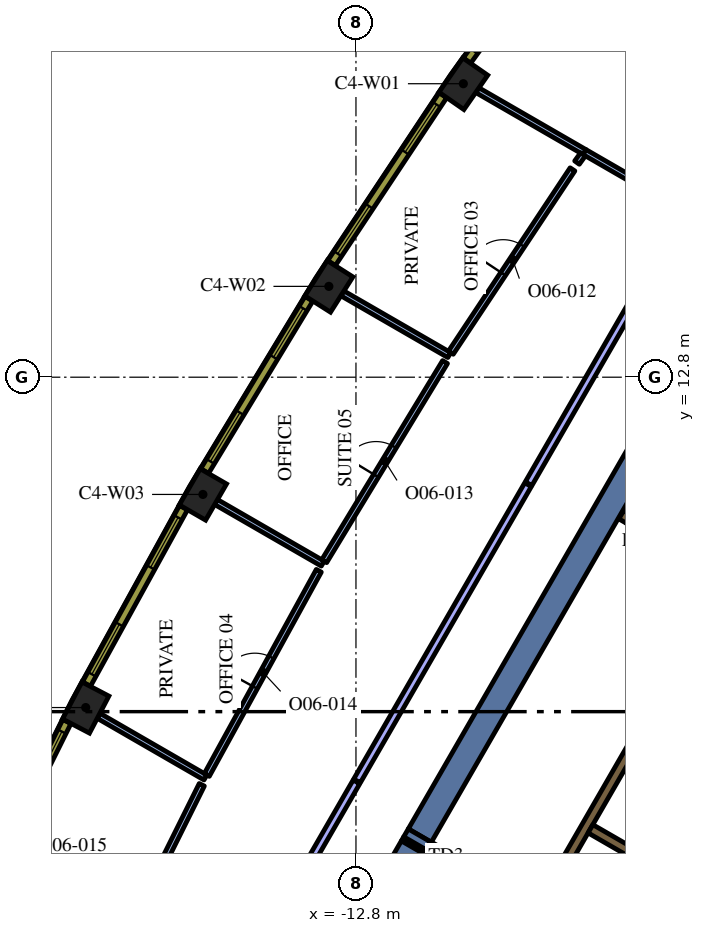
"""IFC4 building model, lengths in metres.
Left out: names, types, materials, properties, quantities, classifications, styles, units other than length and angle.
Written with IfcOpenShell. Run it as: python <this file> out.ifc"""

import sys

from ifc_helpers import new_model, si_unit, direction, frame, frame_2d, origin, origin_2d, place, context, subcontext, project, spatial, polyline, rectangle, outline, extrude, element, fill, save


model = new_model("IFC4")
c1 = context("Model", 3, precision=1e-05, world=origin(), true_north=direction((0.0, 1.0)))
c2 = subcontext(c1, "Body", "Model", "MODEL_VIEW")
j1 = project(units=[si_unit("LENGTHUNIT", "METRE"), si_unit("PLANEANGLEUNIT", "RADIAN")], contexts=[c1])
p1 = place(None, origin())
s1 = spatial("IfcSite", under=j1, at=p1, CompositionType="ELEMENT")
p2 = place(p1, origin())
s2 = spatial("IfcBuilding", under=s1, at=p2, CompositionType="ELEMENT")
p3 = place(p2, frame((0.0, 0.0, 205.8)))
s3 = spatial("IfcBuildingStorey", under=s2, at=p3, CompositionType="ELEMENT", Elevation=205.8)
for number, where, z_axis, x_axis in (
    (1, (-9.975, 20.522, 0.0), (0.0, 0.0, 1.0), (-0.57, -0.822, 0.0)),
    (2, (-13.513, 15.19, 0.0), (0.0, 0.0, 1.0), (-0.536, -0.845, 0.0)),
    (3, (-16.827, 9.715, 0.0), (0.0, 0.0, 1.0), (-0.5, -0.866, 0.0)),
    (4, (-19.912, 4.108, 0.0), (0.0, 0.0, 1.0), (-0.464, -0.886, 0.0)),
):
    element("IfcColumn", number, at=place(p3, frame(where, z_axis=z_axis, x_axis=x_axis)), inside=s3, PredefinedType="COLUMN", context=c2, shape_type="SweptSolid", body=[
        extrude(rectangle(XDim=1.1, YDim=0.8, at=origin_2d()), origin(), (0.0, 0.0, 1.0), 4.2),
    ])
p4 = place(p3, frame((-11.301, 0.426, 0.0), z_axis=(0.0, 0.0, 1.0), x_axis=(0.50111559984, 0.865380353138, 0.0)))
e5 = element("IfcWall", 5, at=p4, inside=s3, PredefinedType="SOLIDWALL", context=c2, shape_type="SweptSolid", body=[
    extrude(rectangle(XDim=0.121, YDim=0.7, at=frame_2d((0.061, 0.0))), origin(), (0.0, 0.0, 1.0), 4.2),
])
p5 = place(p3, frame((-15.321, -6.537, 0.0), z_axis=(0.0, 0.0, 1.0), x_axis=(0.500000268222, 0.866025248926, 0.0)))
e6 = element("IfcWall", 6, at=p5, inside=s3, PredefinedType="SOLIDWALL", context=c2, shape_type="SweptSolid", body=[
    extrude(rectangle(XDim=8.038, YDim=0.7, at=frame_2d((4.019, 0.0))), origin(), (0.0, 0.0, 1.0), 4.2),
])
p6 = place(p3, frame((-4.696, 11.867, 0.0), z_axis=(0.0, 0.0, 1.0), x_axis=(-0.500003726532, -0.866023252259, 0.0)))
e7 = element("IfcWall", 7, at=p6, inside=s3, PredefinedType="SOLIDWALL", context=c2, shape_type="SweptSolid", body=[
    extrude(rectangle(XDim=12.848, YDim=0.7, at=frame_2d((6.424, 0.0))), origin(), (0.0, 0.0, 1.0), 4.2),
])
p7 = place(p3, origin())
e8 = element("IfcWall", 8, at=p7, inside=s3, PredefinedType="SOLIDWALL", context=c2, shape_type="SweptSolid", body=[
    extrude(outline(polyline([(-11.543, 0.708), (-11.424, 0.914), (-10.843, 0.578), (-10.962, 0.372), (-11.543, 0.708)])), origin(), (0.0, 0.0, 1.0), 4.2),
])
p8 = place(p3, frame((-8.06, -1.311, 0.0), z_axis=(0.0, 0.0, 1.0), x_axis=(0.50000273126, 0.866023826885, 0.0)))
e9 = element("IfcWall", 9, at=p8, inside=s3, PredefinedType="SOLIDWALL", context=c2, shape_type="SweptSolid", body=[
    extrude(rectangle(XDim=10.33, YDim=0.25, at=frame_2d((5.165, 0.0))), origin(), (0.0, 0.0, 1.0), 4.2),
])
p9 = place(p3, frame((-4.724, -0.182, 0.0), z_axis=(0.0, 0.0, 1.0), x_axis=(-0.866008176907, 0.50002983664, 0.0)))
e10 = element("IfcWall", 10, at=p9, inside=s3, PredefinedType="SOLIDWALL", context=c2, shape_type="SweptSolid", body=[
    extrude(rectangle(XDim=2.2, YDim=0.25, at=frame_2d((1.1, 0.0))), origin(), (0.0, 0.0, 1.0), 4.2),
])
p10 = place(p3, frame((-5.629, 9.07, 0.0), z_axis=(0.0, 0.0, 1.0), x_axis=(-0.866185586049, 0.49972245349, 0.0)))
e11 = element("IfcWall", 11, at=p10, inside=s3, PredefinedType="SOLIDWALL", context=c2, shape_type="SweptSolid", body=[
    extrude(rectangle(XDim=0.22, YDim=0.25, at=frame_2d((0.11, 0.0))), origin(), (0.0, 0.0, 1.0), 4.2),
])
p11 = place(p3, frame((-0.898, 6.194, 0.0), z_axis=(0.0, 0.0, 1.0), x_axis=(-0.499996202215, -0.866027596426, 0.0)))
e12 = element("IfcWall", 12, at=p11, inside=s3, PredefinedType="SOLIDWALL", context=c2, shape_type="SweptSolid", body=[
    extrude(rectangle(XDim=9.83, YDim=0.25, at=frame_2d((4.915, 0.0))), origin(), (0.0, 0.0, 1.0), 4.2),
])
p12 = place(p11, frame((0.585, 0.0, 0.0)))
e13 = element("IfcOpeningElement", 13, at=p12, cuts=e12, PredefinedType="OPENING", context=c2, shape_type="SweptSolid", body=[
    extrude(rectangle(XDim=1.1, YDim=2.1, at=frame_2d((0.55, 1.05))), frame((0.0, 0.135, 0.0), z_axis=(0.0, -1.0, 0.0), x_axis=(1.0, 0.0, 0.0)), (0.0, 0.0, 1.0), 0.27),
])
p13 = place(p11, frame((3.105, 0.0, 0.0)))
e14 = element("IfcOpeningElement", 14, at=p13, cuts=e12, PredefinedType="OPENING", context=c2, shape_type="SweptSolid", body=[
    extrude(rectangle(XDim=1.1, YDim=2.1, at=frame_2d((0.55, 1.05))), frame((0.0, 0.135, 0.0), z_axis=(0.0, -1.0, 0.0), x_axis=(1.0, 0.0, 0.0)), (0.0, 0.0, 1.0), 0.27),
])
p14 = place(p11, frame((5.625, 0.0, 0.0)))
e15 = element("IfcOpeningElement", 15, at=p14, cuts=e12, PredefinedType="OPENING", context=c2, shape_type="SweptSolid", body=[
    extrude(rectangle(XDim=1.1, YDim=2.1, at=frame_2d((0.55, 1.05))), frame((0.0, 0.135, 0.0), z_axis=(0.0, -1.0, 0.0), x_axis=(1.0, 0.0, 0.0)), (0.0, 0.0, 1.0), 0.27),
])
p15 = place(p11, frame((8.145, 0.0, 0.0)))
e16 = element("IfcOpeningElement", 16, at=p15, cuts=e12, PredefinedType="OPENING", context=c2, shape_type="SweptSolid", body=[
    extrude(rectangle(XDim=1.1, YDim=2.1, at=frame_2d((0.55, 1.05))), frame((0.0, 0.135, 0.0), z_axis=(0.0, -1.0, 0.0), x_axis=(1.0, 0.0, 0.0)), (0.0, 0.0, 1.0), 0.27),
])
p16 = place(p3, frame((-9.95, -0.075, 0.0), z_axis=(0.0, 0.0, 1.0), x_axis=(-0.865952669392, 0.500125958508, 0.0)))
e17 = element("IfcWall", 17, at=p16, inside=s3, PredefinedType="SOLIDWALL", context=c2, shape_type="SweptSolid", body=[
    extrude(rectangle(XDim=1.1, YDim=0.25, at=frame_2d((0.55, 0.0))), origin(), (0.0, 0.0, 1.0), 4.2),
])
p17 = place(p16, frame((0.1, 0.0, 0.0)))
e18 = element("IfcOpeningElement", 18, at=p17, cuts=e17, PredefinedType="OPENING", context=c2, shape_type="SweptSolid", body=[
    extrude(rectangle(XDim=0.9, YDim=2.1, at=frame_2d((0.45, 1.05))), frame((0.0, 0.135, 0.0), z_axis=(0.0, -1.0, 0.0), x_axis=(1.0, 0.0, 0.0)), (0.0, 0.0, 1.0), 0.27),
])
p18 = place(p3, frame((-6.78, 18.721, 0.0), z_axis=(0.0, 0.0, 1.0), x_axis=(-0.866019875663, 0.500009574865, 0.0)))
e19 = element("IfcWall", 19, at=p18, inside=s3, PredefinedType="PARTITIONING", context=c2, shape_type="SweptSolid", body=[
    extrude(rectangle(XDim=3.263, YDim=0.15, at=frame_2d((1.632, 0.0))), origin(), (0.0, 0.0, 1.0), 3.45),
])
p19 = place(p3, frame((-4.111, 17.18, 0.0), z_axis=(0.0, 0.0, 1.0), x_axis=(-0.866022449854, 0.500005116322, 0.0)))
e20 = element("IfcWall", 20, at=p19, inside=s3, PredefinedType="PARTITIONING", context=c2, shape_type="SweptSolid", body=[
    extrude(rectangle(XDim=3.09, YDim=0.15, at=frame_2d((1.545, 0.0))), origin(), (0.0, 0.0, 1.0), 3.45),
])
p20 = place(p3, frame((-10.344, 13.382, 0.0), z_axis=(0.0, 0.0, 1.0), x_axis=(-0.865990253757, 0.500060876692, 0.0)))
e21 = element("IfcWall", 21, at=p20, inside=s3, PredefinedType="PARTITIONING", context=c2, shape_type="SweptSolid", body=[
    extrude(rectangle(XDim=3.247, YDim=0.15, at=frame_2d((1.624, 0.0))), origin(), (0.0, 0.0, 1.0), 3.45),
])
p21 = place(p3, frame((-6.828, 18.662, 0.0), z_axis=(0.0, 0.0, 1.0), x_axis=(-0.586967571461, -0.809610443394, 0.0)))
e22 = element("IfcWall", 22, at=p21, inside=s3, PredefinedType="PARTITIONING", context=c2, shape_type="SweptSolid", body=[
    extrude(rectangle(XDim=0.265, YDim=0.15, at=frame_2d((0.133, 0.0))), origin(), (0.0, 0.0, 1.0), 3.45),
])
p22 = place(p3, frame((-10.303, 13.445, 0.0), z_axis=(0.0, 0.0, 1.0), x_axis=(0.552908115949, 0.833242230878, 0.0)))
e23 = element("IfcWall", 23, at=p22, inside=s3, PredefinedType="PARTITIONING", context=c2, shape_type="SweptSolid", body=[
    extrude(rectangle(XDim=5.789, YDim=0.15, at=frame_2d((2.895, 0.0))), origin(), (0.0, 0.0, 1.0), 3.45),
])
p23 = place(p22, frame((2.489, 0.0, 0.0)))
e24 = element("IfcOpeningElement", 24, at=p23, cuts=e23, PredefinedType="OPENING", context=c2, shape_type="SweptSolid", body=[
    extrude(rectangle(XDim=0.9, YDim=2.1, at=frame_2d((0.45, 1.05))), frame((0.0, 0.085, 0.0), z_axis=(0.0, -1.0, 0.0), x_axis=(1.0, 0.0, 0.0)), (0.0, 0.0, 1.0), 0.17),
])
p24 = place(p3, frame((-13.674, 7.895, 0.0), z_axis=(0.0, 0.0, 1.0), x_axis=(-0.866032537582, 0.499987643696, 0.0)))
e25 = element("IfcWall", 25, at=p24, inside=s3, PredefinedType="PARTITIONING", context=c2, shape_type="SweptSolid", body=[
    extrude(rectangle(XDim=3.241, YDim=0.15, at=frame_2d((1.62, 0.0))), origin(), (0.0, 0.0, 1.0), 3.45),
])
p25 = place(p3, frame((-13.635, 7.959, 0.0), z_axis=(0.0, 0.0, 1.0), x_axis=(0.518788941184, 0.854902353784, 0.0)))
e26 = element("IfcWall", 26, at=p25, inside=s3, PredefinedType="PARTITIONING", context=c2, shape_type="SweptSolid", body=[
    extrude(rectangle(XDim=6.129, YDim=0.15, at=frame_2d((3.064, 0.0))), origin(), (0.0, 0.0, 1.0), 3.45),
])
p26 = place(p25, frame((2.629, 0.0, 0.0)))
e27 = element("IfcOpeningElement", 27, at=p26, cuts=e26, PredefinedType="OPENING", context=c2, shape_type="SweptSolid", body=[
    extrude(rectangle(XDim=0.9, YDim=2.1, at=frame_2d((0.45, 1.05))), frame((0.0, 0.085, 0.0), z_axis=(0.0, -1.0, 0.0), x_axis=(1.0, 0.0, 0.0)), (0.0, 0.0, 1.0), 0.17),
])
p27 = place(p3, frame((-16.761, 2.268, 0.0), z_axis=(0.0, 0.0, 1.0), x_axis=(-0.866022812202, 0.500004488726, 0.0)))
e28 = element("IfcWall", 28, at=p27, inside=s3, PredefinedType="PARTITIONING", context=c2, shape_type="SweptSolid", body=[
    extrude(rectangle(XDim=3.247, YDim=0.15, at=frame_2d((1.624, 0.0))), origin(), (0.0, 0.0, 1.0), 3.45),
])
p28 = place(p3, frame((-16.725, 2.333, 0.0), z_axis=(0.0, 0.0, 1.0), x_axis=(0.480955103875, 0.876745224142, 0.0)))
e29 = element("IfcWall", 29, at=p28, inside=s3, PredefinedType="PARTITIONING", context=c2, shape_type="SweptSolid", body=[
    extrude(rectangle(XDim=6.129, YDim=0.15, at=frame_2d((3.064, 0.0))), origin(), (0.0, 0.0, 1.0), 3.45),
])
p29 = place(p28, frame((2.629, 0.0, 0.0)))
e30 = element("IfcOpeningElement", 30, at=p29, cuts=e29, PredefinedType="OPENING", context=c2, shape_type="SweptSolid", body=[
    extrude(rectangle(XDim=0.9, YDim=2.1, at=frame_2d((0.45, 1.05))), frame((0.0, 0.085, 0.0), z_axis=(0.0, -1.0, 0.0), x_axis=(1.0, 0.0, 0.0)), (0.0, 0.0, 1.0), 0.17),
])
p30 = place(p3, frame((-19.467, -3.175, 0.0), z_axis=(0.0, 0.0, 1.0), x_axis=(0.445180755526, 0.895440726631, 0.0)))
e31 = element("IfcWall", 31, at=p30, inside=s3, PredefinedType="PARTITIONING", context=c2, shape_type="SweptSolid", body=[
    extrude(rectangle(XDim=5.864, YDim=0.15, at=frame_2d((2.932, 0.0))), origin(), (0.0, 0.0, 1.0), 3.45),
])
p31 = place(p30, frame((2.464, 0.0, 0.0)))
e32 = element("IfcOpeningElement", 32, at=p31, cuts=e31, PredefinedType="OPENING", context=c2, shape_type="SweptSolid", body=[
    extrude(rectangle(XDim=0.9, YDim=2.1, at=frame_2d((0.45, 1.05))), frame((0.0, 0.085, 0.0), z_axis=(0.0, -1.0, 0.0), x_axis=(1.0, 0.0, 0.0)), (0.0, 0.0, 1.0), 0.17),
])
p32 = place(p3, frame((-8.272, 9.972, 0.0), z_axis=(0.0, 0.0, 1.0), x_axis=(-0.5000018851, -0.866024315419, 0.0)))
e33 = element("IfcWall", 33, at=p32, inside=s3, PredefinedType="PARTITIONING", context=c2, shape_type="SweptSolid", body=[
    extrude(rectangle(XDim=9.0, YDim=0.2, at=frame_2d((4.5, 0.0))), origin(), (0.0, 0.0, 1.0), 3.45),
])
p33 = place(p3, frame((-12.787, 2.152, 0.0), z_axis=(0.0, 0.0, 1.0), x_axis=(-0.50000660679, -0.866021589319, 0.0)))
e34 = element("IfcWall", 34, at=p33, inside=s3, PredefinedType="PARTITIONING", context=c2, shape_type="SweptSolid", body=[
    extrude(rectangle(XDim=9.817, YDim=0.2, at=frame_2d((4.909, 0.0))), origin(), (0.0, 0.0, 1.0), 3.45),
])
p34 = place(p33, frame((4.4, 0.0, 0.0)))
e35 = element("IfcOpeningElement", 35, at=p34, cuts=e34, PredefinedType="OPENING", context=c2, shape_type="SweptSolid", body=[
    extrude(rectangle(XDim=1.0, YDim=2.1, at=frame_2d((0.5, 1.05))), frame((0.0, 0.11, 0.0), z_axis=(0.0, -1.0, 0.0), x_axis=(1.0, 0.0, 0.0)), (0.0, 0.0, 1.0), 0.22),
])
p35 = place(p3, frame((-4.148, 17.115, 0.0), z_axis=(0.0, 0.0, 1.0), x_axis=(-0.499983057696, -0.866035185207, 0.0)))
e36 = element("IfcWall", 36, at=p35, inside=s3, PredefinedType="PARTITIONING", context=c2, shape_type="SweptSolid", body=[
    extrude(rectangle(XDim=8.218, YDim=0.2, at=frame_2d((4.109, 0.0))), origin(), (0.0, 0.0, 1.0), 3.45),
])
p36 = place(p3, frame((-6.761, 25.432, 0.0), z_axis=(0.0, 0.0, 1.0), x_axis=(-0.586998456641, -0.80958805074, 0.0)))
e37 = element("IfcWall", 37, at=p36, inside=s3, PredefinedType="SOLIDWALL", context=c2, shape_type="SweptSolid", body=[
    extrude(rectangle(XDim=5.311, YDim=0.24, at=frame_2d((2.655, 0.0))), origin(), (0.0, 0.0, 1.0), 3.95),
])
p37 = place(p36, frame((0.271, 0.0, 0.9)))
e38 = element("IfcOpeningElement", 38, at=p37, cuts=e37, PredefinedType="OPENING", context=c2, shape_type="SweptSolid", body=[
    extrude(rectangle(XDim=1.5, YDim=2.55, at=frame_2d((0.75, 1.275))), frame((0.0, 0.13, 0.0), z_axis=(0.0, -1.0, 0.0), x_axis=(1.0, 0.0, 0.0)), (0.0, 0.0, 1.0), 0.26),
])
p38 = place(p36, frame((3.504, 0.0, 0.9)))
e39 = element("IfcOpeningElement", 39, at=p38, cuts=e37, PredefinedType="OPENING", context=c2, shape_type="SweptSolid", body=[
    extrude(rectangle(XDim=1.5, YDim=2.55, at=frame_2d((0.75, 1.275))), frame((0.0, 0.13, 0.0), z_axis=(0.0, -1.0, 0.0), x_axis=(1.0, 0.0, 0.0)), (0.0, 0.0, 1.0), 0.26),
])
p39 = place(p3, frame((-10.513, 20.218, 0.0), z_axis=(0.0, 0.0, 1.0), x_axis=(-0.552901821755, -0.833246407433, 0.0)))
e40 = element("IfcWall", 40, at=p39, inside=s3, PredefinedType="SOLIDWALL", context=c2, shape_type="SweptSolid", body=[
    extrude(rectangle(XDim=5.298, YDim=0.24, at=frame_2d((2.649, 0.0))), origin(), (0.0, 0.0, 1.0), 3.95),
])
p40 = place(p39, frame((0.294, 0.0, 0.9)))
e41 = element("IfcOpeningElement", 41, at=p40, cuts=e40, PredefinedType="OPENING", context=c2, shape_type="SweptSolid", body=[
    extrude(rectangle(XDim=1.5, YDim=2.55, at=frame_2d((0.75, 1.275))), frame((0.0, 0.13, 0.0), z_axis=(0.0, -1.0, 0.0), x_axis=(1.0, 0.0, 0.0)), (0.0, 0.0, 1.0), 0.26),
])
p41 = place(p39, frame((3.504, 0.0, 0.9)))
e42 = element("IfcOpeningElement", 42, at=p41, cuts=e40, PredefinedType="OPENING", context=c2, shape_type="SweptSolid", body=[
    extrude(rectangle(XDim=1.5, YDim=2.55, at=frame_2d((0.75, 1.275))), frame((0.0, 0.13, 0.0), z_axis=(0.0, -1.0, 0.0), x_axis=(1.0, 0.0, 0.0)), (0.0, 0.0, 1.0), 0.26),
])
p42 = place(p3, frame((-14.038, 14.864, 0.0), z_axis=(0.0, 0.0, 1.0), x_axis=(-0.517846166225, -0.855473756538, 0.0)))
e43 = element("IfcWall", 43, at=p42, inside=s3, PredefinedType="SOLIDWALL", context=c2, shape_type="SweptSolid", body=[
    extrude(rectangle(XDim=5.298, YDim=0.24, at=frame_2d((2.649, 0.0))), origin(), (0.0, 0.0, 1.0), 3.95),
])
p43 = place(p42, frame((0.294, 0.0, 0.9)))
e44 = element("IfcOpeningElement", 44, at=p43, cuts=e43, PredefinedType="OPENING", context=c2, shape_type="SweptSolid", body=[
    extrude(rectangle(XDim=1.5, YDim=2.55, at=frame_2d((0.75, 1.275))), frame((0.0, 0.13, 0.0), z_axis=(0.0, -1.0, 0.0), x_axis=(1.0, 0.0, 0.0)), (0.0, 0.0, 1.0), 0.26),
])
p44 = place(p42, frame((3.504, 0.0, 0.9)))
e45 = element("IfcOpeningElement", 45, at=p44, cuts=e43, PredefinedType="OPENING", context=c2, shape_type="SweptSolid", body=[
    extrude(rectangle(XDim=1.5, YDim=2.55, at=frame_2d((0.75, 1.275))), frame((0.0, 0.13, 0.0), z_axis=(0.0, -1.0, 0.0), x_axis=(1.0, 0.0, 0.0)), (0.0, 0.0, 1.0), 0.26),
])
p45 = place(p3, frame((-17.338, 9.368, 0.0), z_axis=(0.0, 0.0, 1.0), x_axis=(-0.481925825015, -0.876212017256, 0.0)))
e46 = element("IfcWall", 46, at=p45, inside=s3, PredefinedType="SOLIDWALL", context=c2, shape_type="SweptSolid", body=[
    extrude(rectangle(XDim=5.299, YDim=0.24, at=frame_2d((2.649, 0.0))), origin(), (0.0, 0.0, 1.0), 3.95),
])
p46 = place(p45, frame((0.295, 0.0, 0.9)))
e47 = element("IfcOpeningElement", 47, at=p46, cuts=e46, PredefinedType="OPENING", context=c2, shape_type="SweptSolid", body=[
    extrude(rectangle(XDim=1.5, YDim=2.55, at=frame_2d((0.75, 1.275))), frame((0.0, 0.13, 0.0), z_axis=(0.0, -1.0, 0.0), x_axis=(1.0, 0.0, 0.0)), (0.0, 0.0, 1.0), 0.26),
])
p47 = place(p45, frame((3.504, 0.0, 0.9)))
e48 = element("IfcOpeningElement", 48, at=p47, cuts=e46, PredefinedType="OPENING", context=c2, shape_type="SweptSolid", body=[
    extrude(rectangle(XDim=1.5, YDim=2.55, at=frame_2d((0.75, 1.275))), frame((0.0, 0.13, 0.0), z_axis=(0.0, -1.0, 0.0), x_axis=(1.0, 0.0, 0.0)), (0.0, 0.0, 1.0), 0.26),
])
p48 = place(p3, frame((-20.407, 3.74, 0.0), z_axis=(0.0, 0.0, 1.0), x_axis=(-0.445129582031, -0.895466166419, 0.0)))
e49 = element("IfcWall", 49, at=p48, inside=s3, PredefinedType="SOLIDWALL", context=c2, shape_type="SweptSolid", body=[
    extrude(rectangle(XDim=5.298, YDim=0.24, at=frame_2d((2.649, 0.0))), origin(), (0.0, 0.0, 1.0), 3.95),
])
p49 = place(p48, frame((0.295, 0.0, 0.9)))
e50 = element("IfcOpeningElement", 50, at=p49, cuts=e49, PredefinedType="OPENING", context=c2, shape_type="SweptSolid", body=[
    extrude(rectangle(XDim=1.5, YDim=2.55, at=frame_2d((0.75, 1.275))), frame((0.0, 0.13, 0.0), z_axis=(0.0, -1.0, 0.0), x_axis=(1.0, 0.0, 0.0)), (0.0, 0.0, 1.0), 0.26),
])
p50 = place(p48, frame((3.504, 0.0, 0.9)))
e51 = element("IfcOpeningElement", 51, at=p50, cuts=e49, PredefinedType="OPENING", context=c2, shape_type="SweptSolid", body=[
    extrude(rectangle(XDim=1.5, YDim=2.55, at=frame_2d((0.75, 1.275))), frame((0.0, 0.13, 0.0), z_axis=(0.0, -1.0, 0.0), x_axis=(1.0, 0.0, 0.0)), (0.0, 0.0, 1.0), 0.26),
])
p51 = place(p17, origin())
e52 = element("IfcDoor", 52, at=p51, inside=s3, OperationType="SINGLE_SWING_LEFT", PredefinedType="DOOR", context=c2, shape_type="SweptSolid", body=[
    extrude(rectangle(XDim=0.9, YDim=2.1, at=frame_2d((0.45, 1.05))), frame((0.0, 0.025, 0.0), z_axis=(0.0, -1.0, 0.0), x_axis=(1.0, 0.0, 0.0)), (0.0, 0.0, 1.0), 0.05),
])
fill(e18, e52)
p52 = place(p23, origin())
e53 = element("IfcDoor", 53, at=p52, inside=s3, OperationType="SINGLE_SWING_RIGHT", PredefinedType="DOOR", context=c2, shape_type="SweptSolid", body=[
    extrude(rectangle(XDim=0.9, YDim=2.1, at=frame_2d((0.45, 1.05))), frame((0.0, 0.025, 0.0), z_axis=(0.0, -1.0, 0.0), x_axis=(1.0, 0.0, 0.0)), (0.0, 0.0, 1.0), 0.05),
])
fill(e24, e53)
p53 = place(p26, origin())
e54 = element("IfcDoor", 54, at=p53, inside=s3, OperationType="SINGLE_SWING_RIGHT", PredefinedType="DOOR", context=c2, shape_type="SweptSolid", body=[
    extrude(rectangle(XDim=0.9, YDim=2.1, at=frame_2d((0.45, 1.05))), frame((0.0, 0.025, 0.0), z_axis=(0.0, -1.0, 0.0), x_axis=(1.0, 0.0, 0.0)), (0.0, 0.0, 1.0), 0.05),
])
fill(e27, e54)
p54 = place(p29, origin())
e55 = element("IfcDoor", 55, at=p54, inside=s3, OperationType="SINGLE_SWING_RIGHT", PredefinedType="DOOR", context=c2, shape_type="SweptSolid", body=[
    extrude(rectangle(XDim=0.9, YDim=2.1, at=frame_2d((0.45, 1.05))), frame((0.0, 0.025, 0.0), z_axis=(0.0, -1.0, 0.0), x_axis=(1.0, 0.0, 0.0)), (0.0, 0.0, 1.0), 0.05),
])
fill(e30, e55)
p55 = place(p40, origin())
e56 = element("IfcWindow", 56, at=p55, inside=s3, PartitioningType="SINGLE_PANEL", PredefinedType="WINDOW", context=c2, shape_type="SweptSolid", body=[
    extrude(rectangle(XDim=1.5, YDim=2.55, at=frame_2d((0.75, 1.275))), frame((0.0, 0.04, 0.0), z_axis=(0.0, -1.0, 0.0), x_axis=(1.0, 0.0, 0.0)), (0.0, 0.0, 1.0), 0.06),
])
fill(e41, e56)
p56 = place(p41, origin())
e57 = element("IfcWindow", 57, at=p56, inside=s3, PartitioningType="SINGLE_PANEL", PredefinedType="WINDOW", context=c2, shape_type="SweptSolid", body=[
    extrude(rectangle(XDim=1.5, YDim=2.55, at=frame_2d((0.75, 1.275))), frame((0.0, 0.04, 0.0), z_axis=(0.0, -1.0, 0.0), x_axis=(1.0, 0.0, 0.0)), (0.0, 0.0, 1.0), 0.06),
])
fill(e42, e57)
p57 = place(p43, origin())
e58 = element("IfcWindow", 58, at=p57, inside=s3, PartitioningType="SINGLE_PANEL", PredefinedType="WINDOW", context=c2, shape_type="SweptSolid", body=[
    extrude(rectangle(XDim=1.5, YDim=2.55, at=frame_2d((0.75, 1.275))), frame((0.0, 0.04, 0.0), z_axis=(0.0, -1.0, 0.0), x_axis=(1.0, 0.0, 0.0)), (0.0, 0.0, 1.0), 0.06),
])
fill(e44, e58)
p58 = place(p44, origin())
e59 = element("IfcWindow", 59, at=p58, inside=s3, PartitioningType="SINGLE_PANEL", PredefinedType="WINDOW", context=c2, shape_type="SweptSolid", body=[
    extrude(rectangle(XDim=1.5, YDim=2.55, at=frame_2d((0.75, 1.275))), frame((0.0, 0.04, 0.0), z_axis=(0.0, -1.0, 0.0), x_axis=(1.0, 0.0, 0.0)), (0.0, 0.0, 1.0), 0.06),
])
fill(e45, e59)
p59 = place(p46, origin())
e60 = element("IfcWindow", 60, at=p59, inside=s3, PartitioningType="SINGLE_PANEL", PredefinedType="WINDOW", context=c2, shape_type="SweptSolid", body=[
    extrude(rectangle(XDim=1.5, YDim=2.55, at=frame_2d((0.75, 1.275))), frame((0.0, 0.04, 0.0), z_axis=(0.0, -1.0, 0.0), x_axis=(1.0, 0.0, 0.0)), (0.0, 0.0, 1.0), 0.06),
])
fill(e47, e60)
p60 = place(p47, origin())
e61 = element("IfcWindow", 61, at=p60, inside=s3, PartitioningType="SINGLE_PANEL", PredefinedType="WINDOW", context=c2, shape_type="SweptSolid", body=[
    extrude(rectangle(XDim=1.5, YDim=2.55, at=frame_2d((0.75, 1.275))), frame((0.0, 0.04, 0.0), z_axis=(0.0, -1.0, 0.0), x_axis=(1.0, 0.0, 0.0)), (0.0, 0.0, 1.0), 0.06),
])
fill(e48, e61)
p61 = place(p49, origin())
e62 = element("IfcWindow", 62, at=p61, inside=s3, PartitioningType="SINGLE_PANEL", PredefinedType="WINDOW", context=c2, shape_type="SweptSolid", body=[
    extrude(rectangle(XDim=1.5, YDim=2.55, at=frame_2d((0.75, 1.275))), frame((0.0, 0.04, 0.0), z_axis=(0.0, -1.0, 0.0), x_axis=(1.0, 0.0, 0.0)), (0.0, 0.0, 1.0), 0.06),
])
fill(e50, e62)
save(model, sys.argv[1])
